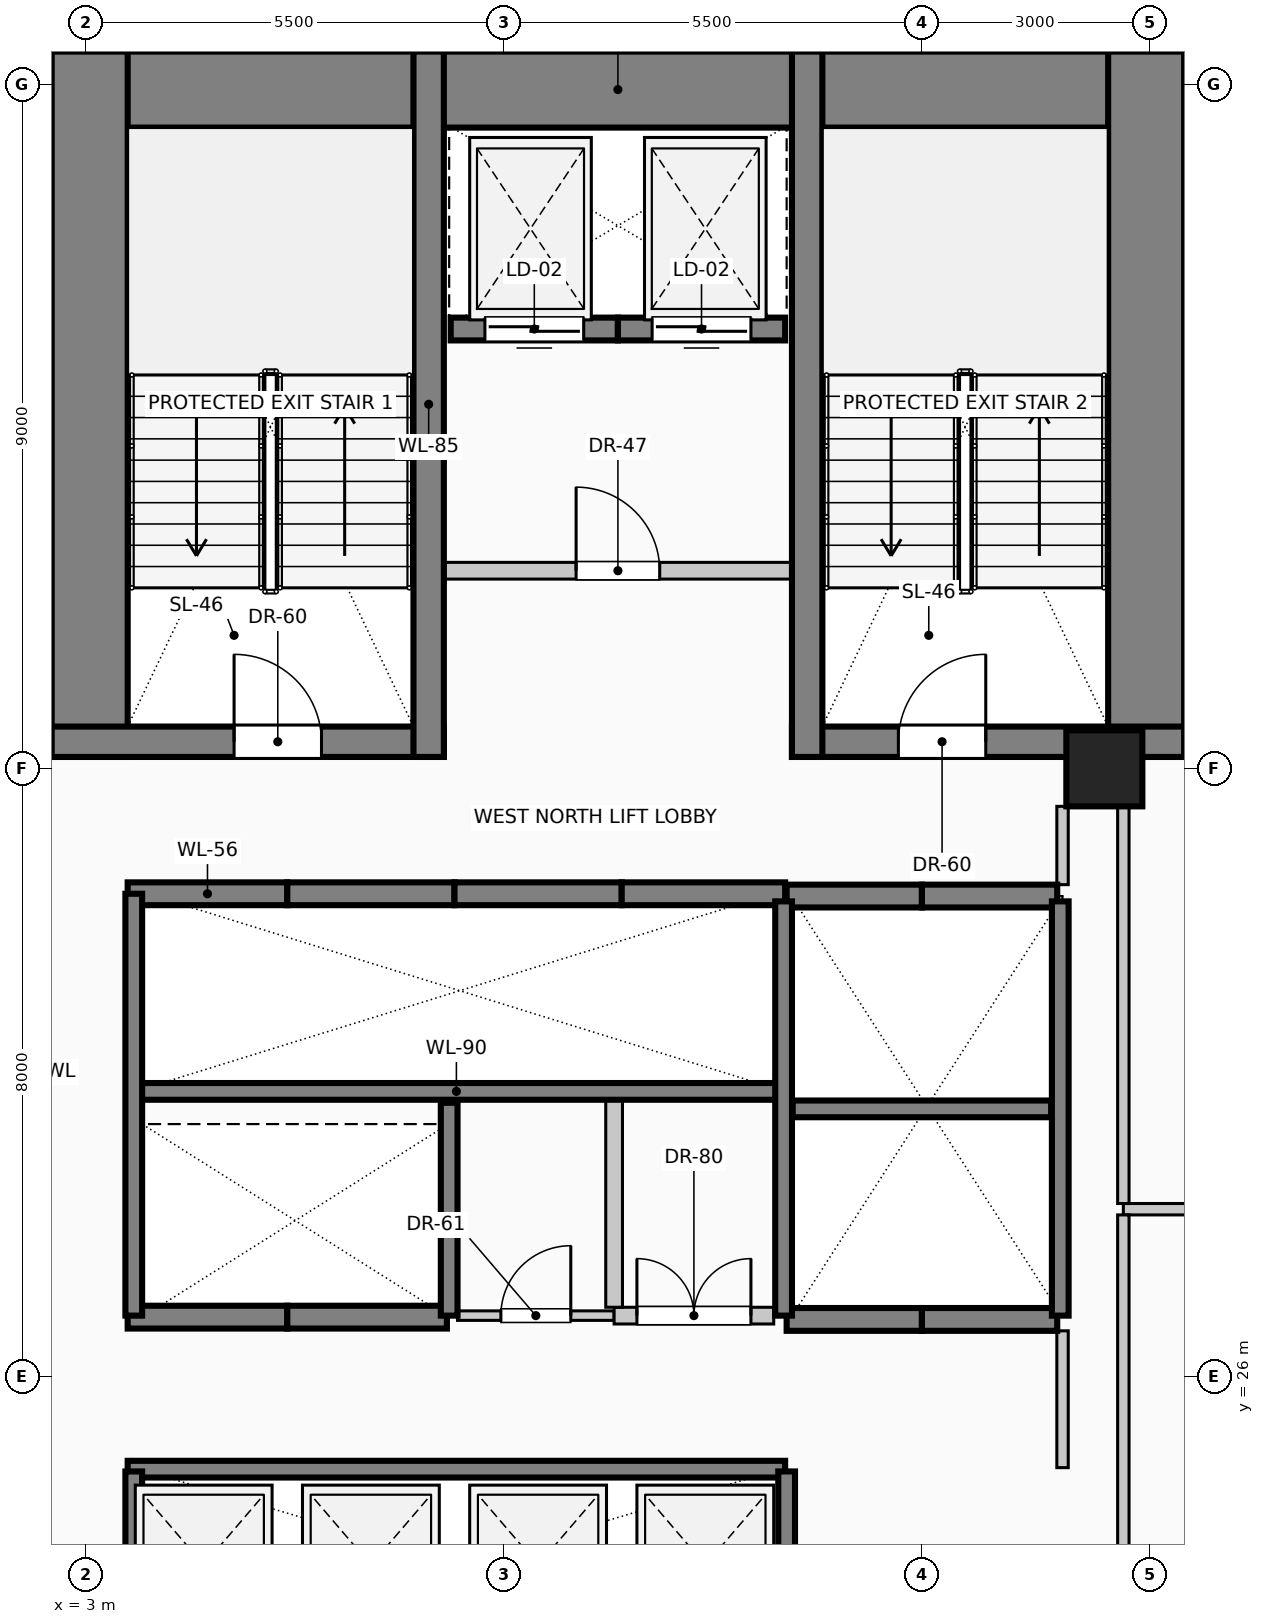
"""IFC4 building model, lengths in metres.
Left out: names, types, materials, properties, quantities, classifications, styles, units other than length and angle.
Written with IfcOpenShell. Run it as: python <this file> out.ifc"""

import sys

from ifc_helpers import new_model, si_unit, direction, frame, frame_2d, origin, origin_2d, place, context, subcontext, project, spatial, rectangle, circle, extrude, element, fill, save


model = new_model("IFC4")
c1 = context("Model", 3, precision=1e-05, world=origin(), true_north=direction((0.0, 1.0)))
c2 = subcontext(c1, "Body", "Model", "MODEL_VIEW")
j1 = project(units=[si_unit("LENGTHUNIT", "METRE"), si_unit("PLANEANGLEUNIT", "RADIAN")], contexts=[c1])
p1 = place(None, origin())
s1 = spatial("IfcSite", under=j1, at=p1, CompositionType="ELEMENT")
p2 = place(p1, origin())
s2 = spatial("IfcBuilding", under=s1, at=p2, CompositionType="ELEMENT")
p3 = place(p2, frame((0.0, 0.0, 66.6)))
s3 = spatial("IfcBuildingStorey", under=s2, at=p3, CompositionType="ELEMENT", Elevation=66.6)
p4 = place(p3, frame((2.55, 42.93, 0.0), z_axis=(0.0, 0.0, 1.0), x_axis=(1.0, 0.0, 0.0)))
e1 = element("IfcWall", 1, at=p4, inside=s3, PredefinedType="SHEAR", context=c2, shape_type="SweptSolid", body=[
    extrude(rectangle(XDim=14.9, YDim=1.0, at=frame_2d((7.45, 0.0))), origin(), (0.0, 0.0, 1.0), 4.0),
])
for number, where, z_axis, x_axis in (
    (2, (3.05, 34.15, 0.0), (0.0, 0.0, 1.0), (0.0, 1.0, 0.0)),
    (3, (16.95, 34.15, 0.0), (0.0, 0.0, 1.0), (0.0, 1.0, 0.0)),
):
    element("IfcWall", number, at=place(p3, frame(where, z_axis=z_axis, x_axis=x_axis)), inside=s3, PredefinedType="SHEAR", context=c2, shape_type="SweptSolid", body=[
        extrude(rectangle(XDim=9.28, YDim=1.0, at=frame_2d((4.64, 0.0))), origin(), (0.0, 0.0, 1.0), 4.0),
    ])
p5 = place(p3, frame((2.55, 34.35, 0.0), z_axis=(0.0, 0.0, 1.0), x_axis=(1.0, 0.0, 0.0)))
e4 = element("IfcWall", 4, at=p5, inside=s3, PredefinedType="SHEAR", context=c2, shape_type="SweptSolid", body=[
    extrude(rectangle(XDim=5.16, YDim=0.4, at=frame_2d((2.58, 0.0))), origin(), (0.0, 0.0, 1.0), 4.0),
])
p6 = place(p5, frame((2.4, 0.0, 0.0)))
e5 = element("IfcOpeningElement", 5, at=p6, cuts=e4, PredefinedType="OPENING", context=c2, shape_type="SweptSolid", body=[
    extrude(rectangle(XDim=1.15, YDim=2.2, at=frame_2d((0.575, 1.1))), frame((0.0, 0.21, 0.0), z_axis=(0.0, -1.0, 0.0), x_axis=(1.0, 0.0, 0.0)), (0.0, 0.0, 1.0), 0.42),
])
p7 = place(p3, frame((12.29, 34.35, 0.0), z_axis=(0.0, 0.0, 1.0), x_axis=(1.0, 0.0, 0.0)))
e6 = element("IfcWall", 6, at=p7, inside=s3, PredefinedType="SHEAR", context=c2, shape_type="SweptSolid", body=[
    extrude(rectangle(XDim=5.16, YDim=0.4, at=frame_2d((2.58, 0.0))), origin(), (0.0, 0.0, 1.0), 4.0),
])
p8 = place(p7, frame((1.4, 0.0, 0.0)))
e7 = element("IfcOpeningElement", 7, at=p8, cuts=e6, PredefinedType="OPENING", context=c2, shape_type="SweptSolid", body=[
    extrude(rectangle(XDim=1.15, YDim=2.2, at=frame_2d((0.575, 1.1))), frame((0.0, 0.21, 0.0), z_axis=(0.0, -1.0, 0.0), x_axis=(1.0, 0.0, 0.0)), (0.0, 0.0, 1.0), 0.42),
])
for number, where, z_axis, x_axis in (
    (8, (7.51, 34.15, 0.0), (0.0, 0.0, 1.0), (0.0, 1.0, 0.0)),
    (9, (12.49, 34.15, 0.0), (0.0, 0.0, 1.0), (0.0, 1.0, 0.0)),
):
    element("IfcWall", number, at=place(p3, frame(where, z_axis=z_axis, x_axis=x_axis)), inside=s3, PredefinedType="SHEAR", context=c2, shape_type="SweptSolid", body=[
        extrude(rectangle(XDim=9.28, YDim=0.4, at=frame_2d((4.64, 0.0))), origin(), (0.0, 0.0, 1.0), 4.0),
    ])
p9 = place(p3, frame((16.4, 34.0, 0.0), z_axis=(0.0, 0.0, 1.0), x_axis=(1.0, 0.0, 0.0)))
e10 = element("IfcColumn", 10, at=p9, inside=s3, PredefinedType="COLUMN", context=c2, shape_type="SweptSolid", body=[
    extrude(circle(Radius=0.5, at=origin_2d()), origin(), (0.0, 0.0, 1.0), 4.0),
])
for number, where, z_axis, x_axis in (
    (11, (14.0, 26.75, 0.0), (0.0, 0.0, 1.0), (-1.0, 0.0, 0.0)),
    (12, (15.78, 26.75, 0.0), (0.0, 0.0, 1.0), (-1.0, 0.0, 0.0)),
    (13, (12.22, 32.32, 0.0), (0.0, 0.0, 1.0), (1.0, 0.0, 0.0)),
    (14, (14.0, 32.32, 0.0), (0.0, 0.0, 1.0), (1.0, 0.0, 0.0)),
):
    element("IfcWall", number, at=place(p3, frame(where, z_axis=z_axis, x_axis=x_axis)), inside=s3, PredefinedType="SOLIDWALL", context=c2, shape_type="SweptSolid", body=[
        extrude(rectangle(XDim=1.78, YDim=0.3, at=frame_2d((0.89, 0.0))), origin(), (0.0, 0.0, 1.0), 4.0),
    ])
p10 = place(p3, frame((3.55, 32.35, 0.0), z_axis=(0.0, 0.0, 1.0), x_axis=(1.0, 0.0, 0.0)))
e15 = element("IfcWall", 15, at=p10, inside=s3, PredefinedType="SOLIDWALL", context=c2, shape_type="SweptSolid", body=[
    extrude(rectangle(XDim=2.1, YDim=0.3, at=frame_2d((1.05, 0.0))), origin(), (0.0, 0.0, 1.0), 4.0),
])
p11 = place(p3, frame((5.65, 32.35, 0.0), z_axis=(0.0, 0.0, 1.0), x_axis=(1.0, 0.0, 0.0)))
e16 = element("IfcWall", 16, at=p11, inside=s3, PredefinedType="SOLIDWALL", context=c2, shape_type="SweptSolid", body=[
    extrude(rectangle(XDim=2.2, YDim=0.3, at=frame_2d((1.1, 0.0))), origin(), (0.0, 0.0, 1.0), 4.0),
])
p12 = place(p3, frame((7.85, 32.35, 0.0), z_axis=(0.0, 0.0, 1.0), x_axis=(1.0, 0.0, 0.0)))
e17 = element("IfcWall", 17, at=p12, inside=s3, PredefinedType="SOLIDWALL", context=c2, shape_type="SweptSolid", body=[
    extrude(rectangle(XDim=2.2, YDim=0.3, at=frame_2d((1.1, 0.0))), origin(), (0.0, 0.0, 1.0), 4.0),
])
p13 = place(p3, frame((10.05, 32.35, 0.0), z_axis=(0.0, 0.0, 1.0), x_axis=(1.0, 0.0, 0.0)))
e18 = element("IfcWall", 18, at=p13, inside=s3, PredefinedType="SOLIDWALL", context=c2, shape_type="SweptSolid", body=[
    extrude(rectangle(XDim=2.15, YDim=0.3, at=frame_2d((1.075, 0.0))), origin(), (0.0, 0.0, 1.0), 4.0),
])
p14 = place(p3, frame((5.65, 26.78, 0.0), z_axis=(0.0, 0.0, 1.0), x_axis=(-1.0, 0.0, 0.0)))
e19 = element("IfcWall", 19, at=p14, inside=s3, PredefinedType="SOLIDWALL", context=c2, shape_type="SweptSolid", body=[
    extrude(rectangle(XDim=2.1, YDim=0.3, at=frame_2d((1.05, 0.0))), origin(), (0.0, 0.0, 1.0), 4.0),
])
p15 = place(p3, frame((7.75, 26.78, 0.0), z_axis=(0.0, 0.0, 1.0), x_axis=(-1.0, 0.0, 0.0)))
e20 = element("IfcWall", 20, at=p15, inside=s3, PredefinedType="SOLIDWALL", context=c2, shape_type="SweptSolid", body=[
    extrude(rectangle(XDim=2.1, YDim=0.3, at=frame_2d((1.05, 0.0))), origin(), (0.0, 0.0, 1.0), 4.0),
])
p16 = place(p3, frame((10.0, 39.78, 0.0), z_axis=(0.0, 0.0, 1.0), x_axis=(-1.0, 0.0, 0.0)))
e21 = element("IfcWall", 21, at=p16, inside=s3, PredefinedType="SOLIDWALL", context=c2, shape_type="SweptSolid", body=[
    extrude(rectangle(XDim=2.2, YDim=0.3, at=frame_2d((1.1, 0.0))), origin(), (0.0, 0.0, 1.0), 4.0),
])
p17 = place(p16, frame((0.45, 0.0, 0.0)))
e22 = element("IfcOpeningElement", 22, at=p17, cuts=e21, PredefinedType="OPENING", context=c2, shape_type="SweptSolid", body=[
    extrude(rectangle(XDim=1.3, YDim=2.25, at=frame_2d((0.65, 1.125))), frame((0.0, 0.16, 0.0), z_axis=(0.0, -1.0, 0.0), x_axis=(1.0, 0.0, 0.0)), (0.0, 0.0, 1.0), 0.32),
])
p18 = place(p3, frame((12.2, 39.78, 0.0), z_axis=(0.0, 0.0, 1.0), x_axis=(-1.0, 0.0, 0.0)))
e23 = element("IfcWall", 23, at=p18, inside=s3, PredefinedType="SOLIDWALL", context=c2, shape_type="SweptSolid", body=[
    extrude(rectangle(XDim=2.2, YDim=0.3, at=frame_2d((1.1, 0.0))), origin(), (0.0, 0.0, 1.0), 4.0),
])
p19 = place(p18, frame((0.45, 0.0, 0.0)))
e24 = element("IfcOpeningElement", 24, at=p19, cuts=e23, PredefinedType="OPENING", context=c2, shape_type="SweptSolid", body=[
    extrude(rectangle(XDim=1.3, YDim=2.25, at=frame_2d((0.65, 1.125))), frame((0.0, 0.16, 0.0), z_axis=(0.0, -1.0, 0.0), x_axis=(1.0, 0.0, 0.0)), (0.0, 0.0, 1.0), 0.32),
])
p20 = place(p3, frame((3.55, 29.75, 0.0), z_axis=(0.0, 0.0, 1.0), x_axis=(1.0, 0.0, 0.0)))
e25 = element("IfcWall", 25, at=p20, inside=s3, PredefinedType="SOLIDWALL", context=c2, shape_type="SweptSolid", body=[
    extrude(rectangle(XDim=8.65, YDim=0.22, at=frame_2d((4.325, 0.0))), origin(), (0.0, 0.0, 1.0), 4.0),
])
p21 = place(p3, frame((3.63, 26.8, 0.0), z_axis=(0.0, 0.0, 1.0), x_axis=(0.0, 1.0, 0.0)))
e26 = element("IfcWall", 26, at=p21, inside=s3, PredefinedType="SOLIDWALL", context=c2, shape_type="SweptSolid", body=[
    extrude(rectangle(XDim=5.55, YDim=0.22, at=frame_2d((2.775, 0.0))), origin(), (0.0, 0.0, 1.0), 4.0),
])
p22 = place(p3, frame((7.78, 26.8, 0.0), z_axis=(0.0, 0.0, 1.0), x_axis=(0.0, 1.0, 0.0)))
e27 = element("IfcWall", 27, at=p22, inside=s3, PredefinedType="SOLIDWALL", context=c2, shape_type="SweptSolid", body=[
    extrude(rectangle(XDim=2.8, YDim=0.22, at=frame_2d((1.4, 0.0))), origin(), (0.0, 0.0, 1.0), 4.0),
])
for number, where, z_axis, x_axis in (
    (28, (12.18, 26.8, 0.0), (0.0, 0.0, 1.0), (0.0, 1.0, 0.0)),
    (29, (15.82, 26.8, 0.0), (0.0, 0.0, 1.0), (0.0, 1.0, 0.0)),
):
    element("IfcWall", number, at=place(p3, frame(where, z_axis=z_axis, x_axis=x_axis)), inside=s3, PredefinedType="SOLIDWALL", context=c2, shape_type="SweptSolid", body=[
        extrude(rectangle(XDim=5.45, YDim=0.22, at=frame_2d((2.725, 0.0))), origin(), (0.0, 0.0, 1.0), 4.0),
    ])
p23 = place(p3, frame((12.3, 29.52, 0.0), z_axis=(0.0, 0.0, 1.0), x_axis=(1.0, 0.0, 0.0)))
e30 = element("IfcWall", 30, at=p23, inside=s3, PredefinedType="SOLIDWALL", context=c2, shape_type="SweptSolid", body=[
    extrude(rectangle(XDim=3.4, YDim=0.22, at=frame_2d((1.7, 0.0))), origin(), (0.0, 0.0, 1.0), 4.0),
])
p24 = place(p3, frame((3.55, 24.78, 0.0), z_axis=(0.0, 0.0, 1.0), x_axis=(1.0, 0.0, 0.0)))
e31 = element("IfcWall", 31, at=p24, inside=s3, PredefinedType="SOLIDWALL", context=c2, shape_type="SweptSolid", body=[
    extrude(rectangle(XDim=8.65, YDim=0.22, at=frame_2d((4.325, 0.0))), origin(), (0.0, 0.0, 1.0), 4.0),
])
for number, where, z_axis, x_axis in (
    (32, (3.63, 22.3, 0.0), (0.0, 0.0, 1.0), (0.0, 1.0, 0.0)),
    (33, (12.22, 22.3, 0.0), (0.0, 0.0, 1.0), (0.0, 1.0, 0.0)),
):
    element("IfcWall", number, at=place(p3, frame(where, z_axis=z_axis, x_axis=x_axis)), inside=s3, PredefinedType="SOLIDWALL", context=c2, shape_type="SweptSolid", body=[
        extrude(rectangle(XDim=2.45, YDim=0.22, at=frame_2d((1.225, 0.0))), origin(), (0.0, 0.0, 1.0), 4.0),
    ])
p25 = place(p3, frame((7.51, 36.6, 0.0), z_axis=(0.0, 0.0, 1.0), x_axis=(1.0, 0.0, 0.0)))
e34 = element("IfcWall", 34, at=p25, inside=s3, PredefinedType="PARTITIONING", context=c2, shape_type="SweptSolid", body=[
    extrude(rectangle(XDim=4.98, YDim=0.22, at=frame_2d((2.49, 0.0))), origin(), (0.0, 0.0, 1.0), 3.7),
])
p26 = place(p25, frame((1.94, 0.0, 0.0)))
e35 = element("IfcOpeningElement", 35, at=p26, cuts=e34, PredefinedType="OPENING", context=c2, shape_type="SweptSolid", body=[
    extrude(rectangle(XDim=1.1, YDim=2.2, at=frame_2d((0.55, 1.1))), frame((0.0, 0.12, 0.0), z_axis=(0.0, -1.0, 0.0), x_axis=(1.0, 0.0, 0.0)), (0.0, 0.0, 1.0), 0.24),
])
p27 = place(p3, frame((7.89, 26.8, 0.0), z_axis=(0.0, 0.0, 1.0), x_axis=(1.0, 0.0, 0.0)))
e36 = element("IfcWall", 36, at=p27, inside=s3, PredefinedType="PARTITIONING", context=c2, shape_type="SweptSolid", body=[
    extrude(rectangle(XDim=2.06, YDim=0.125, at=frame_2d((1.03, 0.0))), origin(), (0.0, 0.0, 1.0), 3.7),
])
p28 = place(p27, frame((0.57, 0.0, 0.0)))
e37 = element("IfcOpeningElement", 37, at=p28, cuts=e36, PredefinedType="OPENING", context=c2, shape_type="SweptSolid", body=[
    extrude(rectangle(XDim=0.92, YDim=2.1, at=frame_2d((0.46, 1.05))), frame((0.0, 0.073, 0.0), z_axis=(0.0, -1.0, 0.0), x_axis=(1.0, 0.0, 0.0)), (0.0, 0.0, 1.0), 0.145),
])
p29 = place(p3, frame((9.95, 26.8, 0.0), z_axis=(0.0, 0.0, 1.0), x_axis=(1.0, 0.0, 0.0)))
e38 = element("IfcWall", 38, at=p29, inside=s3, PredefinedType="PARTITIONING", context=c2, shape_type="SweptSolid", body=[
    extrude(rectangle(XDim=2.1, YDim=0.22, at=frame_2d((1.05, 0.0))), origin(), (0.0, 0.0, 1.0), 3.7),
])
p30 = place(p29, frame((0.3, 0.0, 0.0)))
e39 = element("IfcOpeningElement", 39, at=p30, cuts=e38, PredefinedType="OPENING", context=c2, shape_type="SweptSolid", body=[
    extrude(rectangle(XDim=1.5, YDim=2.25, at=frame_2d((0.75, 1.125))), frame((0.0, 0.12, 0.0), z_axis=(0.0, -1.0, 0.0), x_axis=(1.0, 0.0, 0.0)), (0.0, 0.0, 1.0), 0.24),
])
p31 = place(p3, frame((16.65, 28.2, 0.0), z_axis=(0.0, 0.0, 1.0), x_axis=(1.0, 0.0, 0.0)))
e40 = element("IfcWall", 40, at=p31, inside=s3, PredefinedType="PARTITIONING", context=c2, shape_type="SweptSolid", body=[
    extrude(rectangle(XDim=21.35, YDim=0.15, at=frame_2d((10.675, 0.0))), origin(), (0.0, 0.0, 1.0), 3.7),
])
p32 = place(p3, frame((9.95, 26.91, 0.0), z_axis=(0.0, 0.0, 1.0), x_axis=(0.0, 1.0, 0.0)))
e41 = element("IfcWall", 41, at=p32, inside=s3, PredefinedType="PARTITIONING", context=c2, shape_type="SweptSolid", body=[
    extrude(rectangle(XDim=2.73, YDim=0.22, at=frame_2d((1.365, 0.0))), origin(), (0.0, 0.0, 1.0), 3.7),
])
p33 = place(p3, frame((15.85, 24.8, 0.0), z_axis=(0.0, 0.0, 1.0), x_axis=(0.0, 1.0, 0.0)))
e42 = element("IfcWall", 42, at=p33, inside=s3, PredefinedType="PARTITIONING", context=c2, shape_type="SweptSolid", body=[
    extrude(rectangle(XDim=1.8, YDim=0.15, at=frame_2d((0.9, 0.0))), origin(), (0.0, 0.0, 1.0), 3.7),
])
p34 = place(p3, frame((15.85, 32.47, 0.0), z_axis=(0.0, 0.0, 1.0), x_axis=(0.0, 1.0, 0.0)))
e43 = element("IfcWall", 43, at=p34, inside=s3, PredefinedType="PARTITIONING", context=c2, shape_type="SweptSolid", body=[
    extrude(rectangle(XDim=1.03, YDim=0.15, at=frame_2d((0.515, 0.0))), origin(), (0.0, 0.0, 1.0), 3.7),
])
p35 = place(p3, frame((16.65, 20.29, 0.0), z_axis=(0.0, 0.0, 1.0), x_axis=(0.0, 1.0, 0.0)))
e44 = element("IfcWall", 44, at=p35, inside=s3, PredefinedType="PARTITIONING", context=c2, shape_type="SweptSolid", body=[
    extrude(rectangle(XDim=7.835, YDim=0.15, at=frame_2d((3.917, 0.0))), origin(), (0.0, 0.0, 1.0), 2.995),
])
p36 = place(p3, frame((16.65, 28.275, 0.0), z_axis=(0.0, 0.0, 1.0), x_axis=(0.0, 1.0, 0.0)))
e45 = element("IfcWall", 45, at=p36, inside=s3, PredefinedType="PARTITIONING", context=c2, shape_type="SweptSolid", body=[
    extrude(rectangle(XDim=5.225, YDim=0.15, at=frame_2d((2.613, 0.0))), origin(), (0.0, 0.0, 1.0), 2.995),
])
p37 = place(p17, origin())
e46 = element("IfcDoor", 46, at=p37, inside=s3, OperationType="SLIDING_TO_LEFT", PredefinedType="DOOR", context=c2, shape_type="SweptSolid", body=[
    extrude(rectangle(XDim=1.3, YDim=2.25, at=frame_2d((0.65, 1.125))), frame((0.0, 0.025, 0.0), z_axis=(0.0, -1.0, 0.0), x_axis=(1.0, 0.0, 0.0)), (0.0, 0.0, 1.0), 0.05),
])
fill(e22, e46)
p38 = place(p19, origin())
e47 = element("IfcDoor", 47, at=p38, inside=s3, OperationType="SLIDING_TO_RIGHT", PredefinedType="DOOR", context=c2, shape_type="SweptSolid", body=[
    extrude(rectangle(XDim=1.3, YDim=2.25, at=frame_2d((0.65, 1.125))), frame((0.0, 0.025, 0.0), z_axis=(0.0, -1.0, 0.0), x_axis=(1.0, 0.0, 0.0)), (0.0, 0.0, 1.0), 0.05),
])
fill(e24, e47)
p39 = place(p6, origin())
e48 = element("IfcDoor", 48, at=p39, inside=s3, OperationType="SINGLE_SWING_LEFT", PredefinedType="DOOR", context=c2, shape_type="SweptSolid", body=[
    extrude(rectangle(XDim=1.15, YDim=2.2, at=frame_2d((0.575, 1.1))), frame((0.0, 0.025, 0.0), z_axis=(0.0, -1.0, 0.0), x_axis=(1.0, 0.0, 0.0)), (0.0, 0.0, 1.0), 0.05),
])
fill(e5, e48)
p40 = place(p8, origin())
e49 = element("IfcDoor", 49, at=p40, inside=s3, OperationType="SINGLE_SWING_RIGHT", PredefinedType="DOOR", context=c2, shape_type="SweptSolid", body=[
    extrude(rectangle(XDim=1.15, YDim=2.2, at=frame_2d((0.575, 1.1))), frame((0.0, 0.025, 0.0), z_axis=(0.0, -1.0, 0.0), x_axis=(1.0, 0.0, 0.0)), (0.0, 0.0, 1.0), 0.05),
])
fill(e7, e49)
p41 = place(p26, origin())
e50 = element("IfcDoor", 50, at=p41, inside=s3, OperationType="SINGLE_SWING_LEFT", PredefinedType="DOOR", context=c2, shape_type="SweptSolid", body=[
    extrude(rectangle(XDim=1.1, YDim=2.2, at=frame_2d((0.55, 1.1))), frame((0.0, 0.025, 0.0), z_axis=(0.0, -1.0, 0.0), x_axis=(1.0, 0.0, 0.0)), (0.0, 0.0, 1.0), 0.05),
])
fill(e35, e50)
p42 = place(p28, origin())
e51 = element("IfcDoor", 51, at=p42, inside=s3, OperationType="SINGLE_SWING_RIGHT", PredefinedType="DOOR", context=c2, shape_type="SweptSolid", body=[
    extrude(rectangle(XDim=0.92, YDim=2.1, at=frame_2d((0.46, 1.05))), frame((0.0, 0.025, 0.0), z_axis=(0.0, -1.0, 0.0), x_axis=(1.0, 0.0, 0.0)), (0.0, 0.0, 1.0), 0.05),
])
fill(e37, e51)
p43 = place(p30, origin())
e52 = element("IfcDoor", 52, at=p43, inside=s3, OperationType="DOUBLE_DOOR_SINGLE_SWING", PredefinedType="DOOR", context=c2, shape_type="SweptSolid", body=[
    extrude(rectangle(XDim=1.5, YDim=2.25, at=frame_2d((0.75, 1.125))), frame((0.0, 0.025, 0.0), z_axis=(0.0, -1.0, 0.0), x_axis=(1.0, 0.0, 0.0)), (0.0, 0.0, 1.0), 0.05),
])
fill(e39, e52)
save(model, sys.argv[1])
